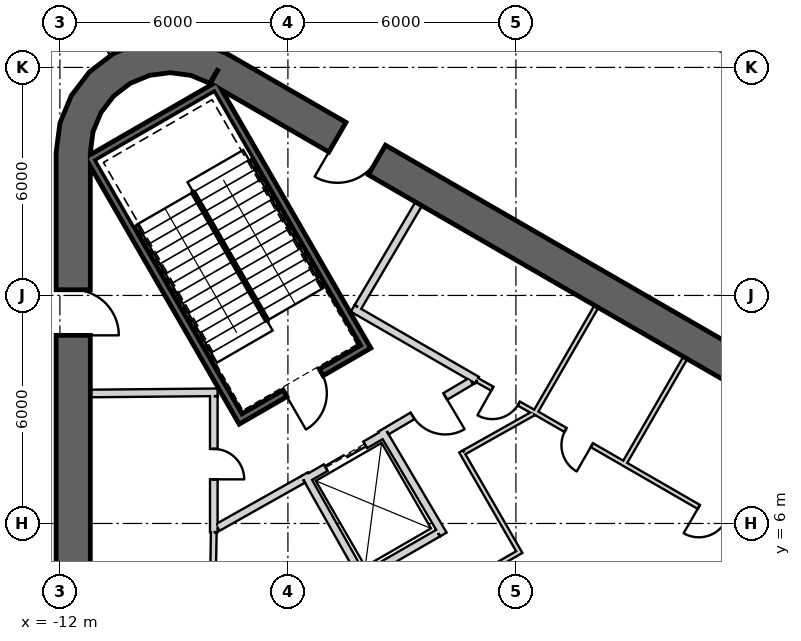
"""IFC4 building model, lengths in metres.
Left out: names, types, materials, properties, quantities, classifications, styles, units other than length and angle.
Written with IfcOpenShell. Run it as: python <this file> out.ifc"""

import sys

from ifc_helpers import new_model, si_unit, direction, frame, frame_2d, origin, place, context, subcontext, project, spatial, polyline, rectangle, outline, extrude, element, fill, save


model = new_model("IFC4")
c1 = context("Model", 3, precision=1e-05, world=origin(), true_north=direction((0.0, 1.0)))
c2 = subcontext(c1, "Body", "Model", "MODEL_VIEW")
j1 = project(units=[si_unit("LENGTHUNIT", "METRE"), si_unit("PLANEANGLEUNIT", "RADIAN")], contexts=[c1])
p1 = place(None, origin())
s1 = spatial("IfcSite", under=j1, at=p1, CompositionType="ELEMENT")
p2 = place(p1, origin())
s2 = spatial("IfcBuilding", under=s1, at=p2, CompositionType="ELEMENT")
p3 = place(p2, frame((0.0, 0.0, 410.3)))
s3 = spatial("IfcBuildingStorey", under=s2, at=p3, CompositionType="ELEMENT", Elevation=410.3)
p4 = place(p3, frame((19.475, 2.208, 0.0), z_axis=(0.0, 0.0, 1.0), x_axis=(-0.866028369851, 0.499994862586, 0.0)))
e1 = element("IfcWall", 1, at=p4, inside=s3, PredefinedType="SHEAR", context=c2, shape_type="SweptSolid", body=[
    extrude(rectangle(XDim=31.523, YDim=0.9, at=frame_2d((15.762, 0.0))), origin(), (0.0, 0.0, 1.0), 5.0),
])
p5 = place(p4, frame((3.612, 0.0, 0.0)))
e2 = element("IfcOpeningElement", 2, at=p5, cuts=e1, PredefinedType="OPENING", context=c2, shape_type="SweptSolid", body=[
    extrude(rectangle(XDim=1.2, YDim=2.4, at=frame_2d((0.6, 1.2))), frame((0.0, 0.46, 0.0), z_axis=(0.0, -1.0, 0.0), x_axis=(1.0, 0.0, 0.0)), (0.0, 0.0, 1.0), 0.92),
])
p6 = place(p4, frame((26.712, 0.0, 0.0)))
e3 = element("IfcOpeningElement", 3, at=p6, cuts=e1, PredefinedType="OPENING", context=c2, shape_type="SweptSolid", body=[
    extrude(rectangle(XDim=1.2, YDim=2.4, at=frame_2d((0.6, 1.2))), frame((0.0, 0.46, 0.0), z_axis=(0.0, -1.0, 0.0), x_axis=(1.0, 0.0, 0.0)), (0.0, 0.0, 1.0), 0.92),
])
p7 = place(p3, frame((-11.65, 15.762, 0.0), z_axis=(0.0, 0.0, 1.0), x_axis=(0.0, -1.0, 0.0)))
e4 = element("IfcWall", 4, at=p7, inside=s3, PredefinedType="SHEAR", context=c2, shape_type="SweptSolid", body=[
    extrude(rectangle(XDim=31.523, YDim=0.9, at=frame_2d((15.762, 0.0))), origin(), (0.0, 0.0, 1.0), 5.0),
])
p8 = place(p7, frame((3.612, 0.0, 0.0)))
e5 = element("IfcOpeningElement", 5, at=p8, cuts=e4, PredefinedType="OPENING", context=c2, shape_type="SweptSolid", body=[
    extrude(rectangle(XDim=1.2, YDim=2.4, at=frame_2d((0.6, 1.2))), frame((0.0, 0.46, 0.0), z_axis=(0.0, -1.0, 0.0), x_axis=(1.0, 0.0, 0.0)), (0.0, 0.0, 1.0), 0.92),
])
p9 = place(p7, frame((26.712, 0.0, 0.0)))
e6 = element("IfcOpeningElement", 6, at=p9, cuts=e4, PredefinedType="OPENING", context=c2, shape_type="SweptSolid", body=[
    extrude(rectangle(XDim=1.2, YDim=2.4, at=frame_2d((0.6, 1.2))), frame((0.0, 0.46, 0.0), z_axis=(0.0, -1.0, 0.0), x_axis=(1.0, 0.0, 0.0)), (0.0, 0.0, 1.0), 0.92),
])
p10 = place(p3, origin())
e7 = element("IfcWall", 7, at=p10, inside=s3, PredefinedType="SHEAR", context=c2, shape_type="SweptSolid", body=[
    extrude(outline(polyline([(-7.6, 18.36), (-8.323, 18.659), (-9.1, 18.762), (-9.876, 18.659), (-10.6, 18.36), (-11.221, 17.883), (-11.698, 17.262), (-11.998, 16.538), (-12.1, 15.762), (-11.2, 15.762), (-11.128, 16.305), (-10.919, 16.812), (-10.585, 17.247), (-10.15, 17.58), (-9.644, 17.79), (-9.1, 17.862), (-8.556, 17.79), (-8.05, 17.58), (-7.6, 18.36)])), origin(), (0.0, 0.0, 1.0), 5.0),
])
p11 = place(p3, frame((5.647, 18.421, 0.0), z_axis=(0.0, 0.0, 1.0), x_axis=(-0.902313153222, 0.431081168137, 0.0)))
e8 = element("IfcWall", 8, at=p11, inside=s3, PredefinedType="SOLIDWALL", context=c2, shape_type="SweptSolid", body=[
    extrude(rectangle(XDim=8.701, YDim=0.24, at=frame_2d((4.351, 0.0))), origin(), (0.0, 0.0, 1.0), 4.75),
])
p12 = place(p3, frame((-2.167, 23.39, 0.04), z_axis=(0.0, 0.0, 1.0), x_axis=(0.902316071354, -0.431075060026, 0.0)))
e9 = element("IfcWall", 9, at=p12, inside=s3, PredefinedType="PARAPET", context=c2, shape_type="SweptSolid", body=[
    extrude(rectangle(XDim=27.207, YDim=0.25, at=frame_2d((13.603, 0.0))), origin(), (0.0, 0.0, 1.0), 1.2),
])
p13 = place(p3, frame((-1.922, 22.664, 0.04), z_axis=(0.0, 0.0, 1.0), x_axis=(0.902313179427, -0.431081113287, 0.0)))
e10 = element("IfcWall", 10, at=p13, inside=s3, PredefinedType="PARAPET", context=c2, shape_type="SweptSolid", body=[
    extrude(rectangle(XDim=26.031, YDim=0.5, at=frame_2d((13.016, 0.0))), origin(), (0.0, 0.0, 1.0), 0.6),
])
p14 = place(p3, frame((-11.245, 15.678, -0.25), z_axis=(0.0, 0.0, 1.0), x_axis=(0.499977274689, -0.866038523851, 0.0)))
e11 = element("IfcWall", 11, at=p14, inside=s3, PredefinedType="SHEAR", context=c2, shape_type="SweptSolid", body=[
    extrude(rectangle(XDim=8.1, YDim=0.2, at=frame_2d((4.05, 0.0))), origin(), (0.0, 0.0, 1.0), 5.0),
])
p15 = place(p3, frame((-7.818, 17.541, -0.25), z_axis=(0.0, 0.0, 1.0), x_axis=(-0.866044365799, -0.499967155389, 0.0)))
e12 = element("IfcWall", 12, at=p15, inside=s3, PredefinedType="SHEAR", context=c2, shape_type="SweptSolid", body=[
    extrude(rectangle(XDim=3.8, YDim=0.2, at=frame_2d((1.9, 0.0))), origin(), (0.0, 0.0, 1.0), 5.0),
])
p16 = place(p3, frame((-7.854, 17.405, -0.25), z_axis=(0.0, 0.0, 1.0), x_axis=(0.499997992926, -0.866026562566, 0.0)))
e13 = element("IfcWall", 13, at=p16, inside=s3, PredefinedType="SHEAR", context=c2, shape_type="SweptSolid", body=[
    extrude(rectangle(XDim=7.9, YDim=0.2, at=frame_2d((3.95, 0.0))), origin(), (0.0, 0.0, 1.0), 5.0),
])
p17 = place(p3, frame((-7.159, 8.8, -0.25), z_axis=(0.0, 0.0, 1.0), x_axis=(0.866047807691, 0.499961193289, 0.0)))
e14 = element("IfcWall", 14, at=p17, inside=s3, PredefinedType="SHEAR", context=c2, shape_type="SweptSolid", body=[
    extrude(rectangle(XDim=3.6, YDim=0.2, at=frame_2d((1.8, 0.0))), origin(), (0.0, 0.0, 1.0), 5.0),
])
p18 = place(p17, frame((1.25, 0.0, 0.25)))
e15 = element("IfcOpeningElement", 15, at=p18, cuts=e14, PredefinedType="OPENING", context=c2, shape_type="SweptSolid", body=[
    extrude(rectangle(XDim=1.1, YDim=2.1, at=frame_2d((0.55, 1.05))), frame((0.0, 0.11, 0.0), z_axis=(0.0, -1.0, 0.0), x_axis=(1.0, 0.0, 0.0)), (0.0, 0.0, 1.0), 0.22),
])
p19 = place(p3, frame((-5.524, 7.168, 0.0), z_axis=(0.0, 0.0, 1.0), x_axis=(0.866024647952, 0.500001309137, 0.0)))
e16 = element("IfcWall", 16, at=p19, inside=s3, PredefinedType="PLUMBINGWALL", context=c2, shape_type="SweptSolid", body=[
    extrude(rectangle(XDim=2.4, YDim=0.2, at=frame_2d((1.2, 0.0))), origin(), (0.0, 0.0, 1.0), 4.75),
])
p20 = place(p19, frame((0.6, 0.0, 0.0)))
e17 = element("IfcOpeningElement", 17, at=p20, cuts=e16, PredefinedType="OPENING", context=c2, shape_type="SweptSolid", body=[
    extrude(rectangle(XDim=1.2, YDim=2.4, at=frame_2d((0.6, 1.2))), frame((0.0, 0.11, 0.0), z_axis=(0.0, -1.0, 0.0), x_axis=(1.0, 0.0, 0.0)), (0.0, 0.0, 1.0), 0.22),
])
p21 = place(p3, frame((-2.047, 5.746, 0.0), z_axis=(0.0, 0.0, 1.0), x_axis=(-0.86605622881, -0.499946605688, 0.0)))
e18 = element("IfcWall", 18, at=p21, inside=s3, PredefinedType="PLUMBINGWALL", context=c2, shape_type="SweptSolid", body=[
    extrude(rectangle(XDim=2.2, YDim=0.2, at=frame_2d((1.1, 0.0))), origin(), (0.0, 0.0, 1.0), 4.75),
])
p22 = place(p3, frame((-3.99, 4.509, 0.0), z_axis=(0.0, 0.0, 1.0), x_axis=(-0.491358283181, 0.870957540612, 0.0)))
e19 = element("IfcWall", 19, at=p22, inside=s3, PredefinedType="PLUMBINGWALL", context=c2, shape_type="SweptSolid", body=[
    extrude(rectangle(XDim=3.2, YDim=0.2, at=frame_2d((1.6, 0.0))), origin(), (0.0, 0.0, 1.0), 4.75),
])
p23 = place(p3, frame((-3.538, 8.465, 0.0), z_axis=(0.0, 0.0, 1.0), x_axis=(0.508616218331, -0.860993346345, 0.0)))
e20 = element("IfcWall", 20, at=p23, inside=s3, PredefinedType="PLUMBINGWALL", context=c2, shape_type="SweptSolid", body=[
    extrude(rectangle(XDim=3.2, YDim=0.2, at=frame_2d((1.6, 0.0))), origin(), (0.0, 0.0, 1.0), 4.75),
])
p24 = place(p3, frame((-7.85, 9.451, 0.0), z_axis=(0.0, 0.0, 1.0), x_axis=(-0.999957167047, -0.009255488683, 0.0)))
e21 = element("IfcWall", 21, at=p24, inside=s3, PredefinedType="PARTITIONING", context=c2, shape_type="SweptSolid", body=[
    extrude(rectangle(XDim=3.35, YDim=0.2, at=frame_2d((1.675, 0.0))), origin(), (0.0, 0.0, 1.0), 4.75),
])
p25 = place(p3, frame((-7.95, 5.772, 0.0), z_axis=(0.0, 0.0, 1.0), x_axis=(0.0, 1.0, 0.0)))
e22 = element("IfcWall", 22, at=p25, inside=s3, PredefinedType="PARTITIONING", context=c2, shape_type="SweptSolid", body=[
    extrude(rectangle(XDim=3.578, YDim=0.2, at=frame_2d((1.789, 0.0))), origin(), (0.0, 0.0, 1.0), 4.75),
])
p26 = place(p25, frame((1.389, 0.0, 0.0)))
e23 = element("IfcOpeningElement", 23, at=p26, cuts=e22, PredefinedType="OPENING", context=c2, shape_type="SweptSolid", body=[
    extrude(rectangle(XDim=0.8, YDim=2.1, at=frame_2d((0.4, 1.05))), frame((0.0, 0.11, 0.0), z_axis=(0.0, -1.0, 0.0), x_axis=(1.0, 0.0, 0.0)), (0.0, 0.0, 1.0), 0.22),
])
p27 = place(p3, frame((-7.951, 5.772, 0.0), z_axis=(0.0, 0.0, 1.0), x_axis=(-0.016723387416, -0.999860154378, 0.0)))
e24 = element("IfcWall", 24, at=p27, inside=s3, PredefinedType="PLUMBINGWALL", context=c2, shape_type="SweptSolid", body=[
    extrude(rectangle(XDim=1.723, YDim=0.15, at=frame_2d((0.861, 0.0))), origin(), (0.0, 0.0, 1.0), 4.75),
])
p28 = place(p3, frame((-4.296, 11.66, 0.0), z_axis=(0.0, 0.0, 1.0), x_axis=(0.866027389382, -0.499996560828, 0.0)))
e25 = element("IfcWall", 25, at=p28, inside=s3, PredefinedType="PARTITIONING", context=c2, shape_type="SweptSolid", body=[
    extrude(rectangle(XDim=3.778, YDim=0.2, at=frame_2d((1.889, 0.0))), origin(), (0.0, 0.0, 1.0), 4.75),
])
p29 = place(p3, frame((4.457, 10.359, 0.0), z_axis=(0.0, 0.0, 1.0), x_axis=(-0.500017246033, -0.866015446554, 0.0)))
e26 = element("IfcWall", 26, at=p29, inside=s3, PredefinedType="PARTITIONING", context=c2, shape_type="SweptSolid", body=[
    extrude(rectangle(XDim=3.25, YDim=0.12, at=frame_2d((1.625, 0.0))), origin(), (0.0, 0.0, 1.0), 4.75),
])
p30 = place(p3, frame((7.497, 4.886, 0.0), z_axis=(0.0, 0.0, 1.0), x_axis=(-0.866030989016, 0.499990325971, 0.0)))
e27 = element("IfcWall", 27, at=p30, inside=s3, PredefinedType="PARTITIONING", context=c2, shape_type="SweptSolid", body=[
    extrude(rectangle(XDim=8.1, YDim=0.12, at=frame_2d((4.05, 0.0))), origin(), (0.0, 0.0, 1.0), 4.75),
])
p31 = place(p30, frame((2.3, 0.0, 0.0)))
e28 = element("IfcOpeningElement", 28, at=p31, cuts=e27, PredefinedType="OPENING", context=c2, shape_type="SweptSolid", body=[
    extrude(rectangle(XDim=0.8, YDim=2.1, at=frame_2d((0.4, 1.05))), frame((0.0, 0.07, 0.0), z_axis=(0.0, -1.0, 0.0), x_axis=(1.0, 0.0, 0.0)), (0.0, 0.0, 1.0), 0.14),
])
p32 = place(p30, frame((6.35, 0.0, 0.0)))
e29 = element("IfcOpeningElement", 29, at=p32, cuts=e27, PredefinedType="OPENING", context=c2, shape_type="SweptSolid", body=[
    extrude(rectangle(XDim=0.8, YDim=2.1, at=frame_2d((0.4, 1.05))), frame((0.0, 0.07, 0.0), z_axis=(0.0, -1.0, 0.0), x_axis=(1.0, 0.0, 0.0)), (0.0, 0.0, 1.0), 0.14),
])
p33 = place(p3, frame((0.494, 8.895, 0.0), z_axis=(0.0, 0.0, 1.0), x_axis=(0.500017246033, 0.866015446554, 0.0)))
e30 = element("IfcWall", 30, at=p33, inside=s3, PredefinedType="PARTITIONING", context=c2, shape_type="SweptSolid", body=[
    extrude(rectangle(XDim=3.25, YDim=0.12, at=frame_2d((1.625, 0.0))), origin(), (0.0, 0.0, 1.0), 4.75),
])
p34 = place(p3, frame((-2.558, 14.409, 0.0), z_axis=(0.0, 0.0, 1.0), x_axis=(-0.508018930956, -0.861345903683, 0.0)))
e31 = element("IfcWall", 31, at=p34, inside=s3, PredefinedType="PARTITIONING", context=c2, shape_type="SweptSolid", body=[
    extrude(rectangle(XDim=3.15, YDim=0.2, at=frame_2d((1.575, 0.0))), origin(), (0.0, 0.0, 1.0), 4.75),
])
p35 = place(p3, frame((-1.024, 9.772, 0.0), z_axis=(0.0, 0.0, 1.0), x_axis=(0.871968924608, -0.489561226527, 0.0)))
e32 = element("IfcWall", 32, at=p35, inside=s3, PredefinedType="PARTITIONING", context=c2, shape_type="SweptSolid", body=[
    extrude(rectangle(XDim=1.722, YDim=0.12, at=frame_2d((0.861, 0.0))), origin(), (0.0, 0.0, 1.0), 4.75),
])
p36 = place(p35, frame((0.461, 0.0, 0.0)))
e33 = element("IfcOpeningElement", 33, at=p36, cuts=e32, PredefinedType="OPENING", context=c2, shape_type="SweptSolid", body=[
    extrude(rectangle(XDim=0.8, YDim=2.1, at=frame_2d((0.4, 1.05))), frame((0.0, 0.07, 0.0), z_axis=(0.0, -1.0, 0.0), x_axis=(1.0, 0.0, 0.0)), (0.0, 0.0, 1.0), 0.14),
])
p37 = place(p3, frame((-5.6, 7.16, 0.0), z_axis=(0.0, 0.0, 1.0), x_axis=(-0.871350695252, -0.490660744185, 0.0)))
e34 = element("IfcWall", 34, at=p37, inside=s3, PredefinedType="PARTITIONING", context=c2, shape_type="SweptSolid", body=[
    extrude(rectangle(XDim=2.582, YDim=0.2, at=frame_2d((1.291, 0.0))), origin(), (0.0, 0.0, 1.0), 4.75),
])
p38 = place(p3, frame((-1.179, 9.745, 0.0), z_axis=(0.0, 0.0, 1.0), x_axis=(-0.860630814782, -0.509229418482, 0.0)))
e35 = element("IfcWall", 35, at=p38, inside=s3, PredefinedType="PARTITIONING", context=c2, shape_type="SweptSolid", body=[
    extrude(rectangle(XDim=2.582, YDim=0.2, at=frame_2d((1.291, 0.0))), origin(), (0.0, 0.0, 1.0), 4.75),
])
p39 = place(p38, frame((0.791, 0.0, 0.0)))
e36 = element("IfcOpeningElement", 36, at=p39, cuts=e35, PredefinedType="OPENING", context=c2, shape_type="SweptSolid", body=[
    extrude(rectangle(XDim=1.0, YDim=2.1, at=frame_2d((0.5, 1.05))), frame((0.0, 0.11, 0.0), z_axis=(0.0, -1.0, 0.0), x_axis=(1.0, 0.0, 0.0)), (0.0, 0.0, 1.0), 0.22),
])
p40 = place(p3, frame((0.14, 5.277, 0.0), z_axis=(0.0, 0.0, 1.0), x_axis=(-0.865989465428, -0.500062241894, 0.0)))
e37 = element("IfcWall", 37, at=p40, inside=s3, PredefinedType="PARTITIONING", context=c2, shape_type="SweptSolid", body=[
    extrude(rectangle(XDim=1.7, YDim=0.12, at=frame_2d((0.85, 0.0))), origin(), (0.0, 0.0, 1.0), 4.75),
])
p41 = place(p3, frame((-1.442, 7.897, 0.0), z_axis=(0.0, 0.0, 1.0), x_axis=(0.499990139034, -0.866031096941, 0.0)))
e38 = element("IfcWall", 38, at=p41, inside=s3, PredefinedType="PARTITIONING", context=c2, shape_type="SweptSolid", body=[
    extrude(rectangle(XDim=3.0, YDim=0.12, at=frame_2d((1.5, 0.0))), origin(), (0.0, 0.0, 1.0), 4.75),
])
p42 = place(p3, frame((0.475, 8.905, 0.0), z_axis=(0.0, 0.0, 1.0), x_axis=(-0.871832572129, -0.489804007921, 0.0)))
e39 = element("IfcWall", 39, at=p42, inside=s3, PredefinedType="PARTITIONING", context=c2, shape_type="SweptSolid", body=[
    extrude(rectangle(XDim=2.104, YDim=0.12, at=frame_2d((1.052, 0.0))), origin(), (0.0, 0.0, 1.0), 4.75),
])
p43 = place(p3, frame((-10.549, 18.212, 0.0), z_axis=(0.0, 0.0, 1.0), x_axis=(-0.499998974385, 0.866025995923, 0.0)))
e40 = element("IfcWall", 40, at=p43, inside=s3, PredefinedType="PARTITIONING", context=c2, shape_type="SweptSolid", body=[
    extrude(rectangle(XDim=7.49, YDim=0.12, at=frame_2d((3.745, 0.0))), origin(), (0.0, 0.0, 1.0), 2.52),
])
p44 = place(p18, origin())
e41 = element("IfcDoor", 41, at=p44, inside=s3, OperationType="SINGLE_SWING_LEFT", PredefinedType="USERDEFINED", context=c2, shape_type="SweptSolid", body=[
    extrude(rectangle(XDim=1.1, YDim=2.1, at=frame_2d((0.55, 1.05))), frame((0.0, 0.025, 0.0), z_axis=(0.0, -1.0, 0.0), x_axis=(1.0, 0.0, 0.0)), (0.0, 0.0, 1.0), 0.05),
])
fill(e15, e41)
p45 = place(p39, origin())
e42 = element("IfcDoor", 42, at=p45, inside=s3, OperationType="SINGLE_SWING_LEFT", PredefinedType="USERDEFINED", context=c2, shape_type="SweptSolid", body=[
    extrude(rectangle(XDim=1.0, YDim=2.1, at=frame_2d((0.5, 1.05))), frame((0.0, 0.025, 0.0), z_axis=(0.0, -1.0, 0.0), x_axis=(1.0, 0.0, 0.0)), (0.0, 0.0, 1.0), 0.05),
])
fill(e36, e42)
p46 = place(p20, origin())
e43 = element("IfcDoor", 43, at=p46, inside=s3, OperationType="SLIDING_TO_LEFT", PredefinedType="USERDEFINED", context=c2, shape_type="SweptSolid", body=[
    extrude(rectangle(XDim=1.2, YDim=2.4, at=frame_2d((0.6, 1.2))), frame((0.0, 0.025, 0.0), z_axis=(0.0, -1.0, 0.0), x_axis=(1.0, 0.0, 0.0)), (0.0, 0.0, 1.0), 0.05),
])
fill(e17, e43)
p47 = place(p26, origin())
e44 = element("IfcDoor", 44, at=p47, inside=s3, OperationType="SINGLE_SWING_LEFT", PredefinedType="USERDEFINED", context=c2, shape_type="SweptSolid", body=[
    extrude(rectangle(XDim=0.8, YDim=2.1, at=frame_2d((0.4, 1.05))), frame((0.0, 0.025, 0.0), z_axis=(0.0, -1.0, 0.0), x_axis=(1.0, 0.0, 0.0)), (0.0, 0.0, 1.0), 0.05),
])
fill(e23, e44)
p48 = place(p31, origin())
e45 = element("IfcDoor", 45, at=p48, inside=s3, OperationType="SINGLE_SWING_RIGHT", PredefinedType="USERDEFINED", context=c2, shape_type="SweptSolid", body=[
    extrude(rectangle(XDim=0.8, YDim=2.1, at=frame_2d((0.4, 1.05))), frame((0.0, 0.025, 0.0), z_axis=(0.0, -1.0, 0.0), x_axis=(1.0, 0.0, 0.0)), (0.0, 0.0, 1.0), 0.05),
])
fill(e28, e45)
p49 = place(p32, origin())
e46 = element("IfcDoor", 46, at=p49, inside=s3, OperationType="SINGLE_SWING_LEFT", PredefinedType="USERDEFINED", context=c2, shape_type="SweptSolid", body=[
    extrude(rectangle(XDim=0.8, YDim=2.1, at=frame_2d((0.4, 1.05))), frame((0.0, 0.025, 0.0), z_axis=(0.0, -1.0, 0.0), x_axis=(1.0, 0.0, 0.0)), (0.0, 0.0, 1.0), 0.05),
])
fill(e29, e46)
p50 = place(p36, origin())
e47 = element("IfcDoor", 47, at=p50, inside=s3, OperationType="SINGLE_SWING_LEFT", PredefinedType="USERDEFINED", context=c2, shape_type="SweptSolid", body=[
    extrude(rectangle(XDim=0.8, YDim=2.1, at=frame_2d((0.4, 1.05))), frame((0.0, 0.025, 0.0), z_axis=(0.0, -1.0, 0.0), x_axis=(1.0, 0.0, 0.0)), (0.0, 0.0, 1.0), 0.05),
])
fill(e33, e47)
p51 = place(p6, origin())
e48 = element("IfcDoor", 48, at=p51, inside=s3, OperationType="SINGLE_SWING_RIGHT", PredefinedType="USERDEFINED", context=c2, shape_type="SweptSolid", body=[
    extrude(rectangle(XDim=1.2, YDim=2.4, at=frame_2d((0.6, 1.2))), frame((0.0, 0.025, 0.0), z_axis=(0.0, -1.0, 0.0), x_axis=(1.0, 0.0, 0.0)), (0.0, 0.0, 1.0), 0.05),
])
fill(e3, e48)
p52 = place(p8, origin())
e49 = element("IfcDoor", 49, at=p52, inside=s3, OperationType="SINGLE_SWING_RIGHT", PredefinedType="USERDEFINED", context=c2, shape_type="SweptSolid", body=[
    extrude(rectangle(XDim=1.2, YDim=2.4, at=frame_2d((0.6, 1.2))), frame((0.0, 0.025, 0.0), z_axis=(0.0, -1.0, 0.0), x_axis=(1.0, 0.0, 0.0)), (0.0, 0.0, 1.0), 0.05),
])
fill(e5, e49)
save(model, sys.argv[1])
